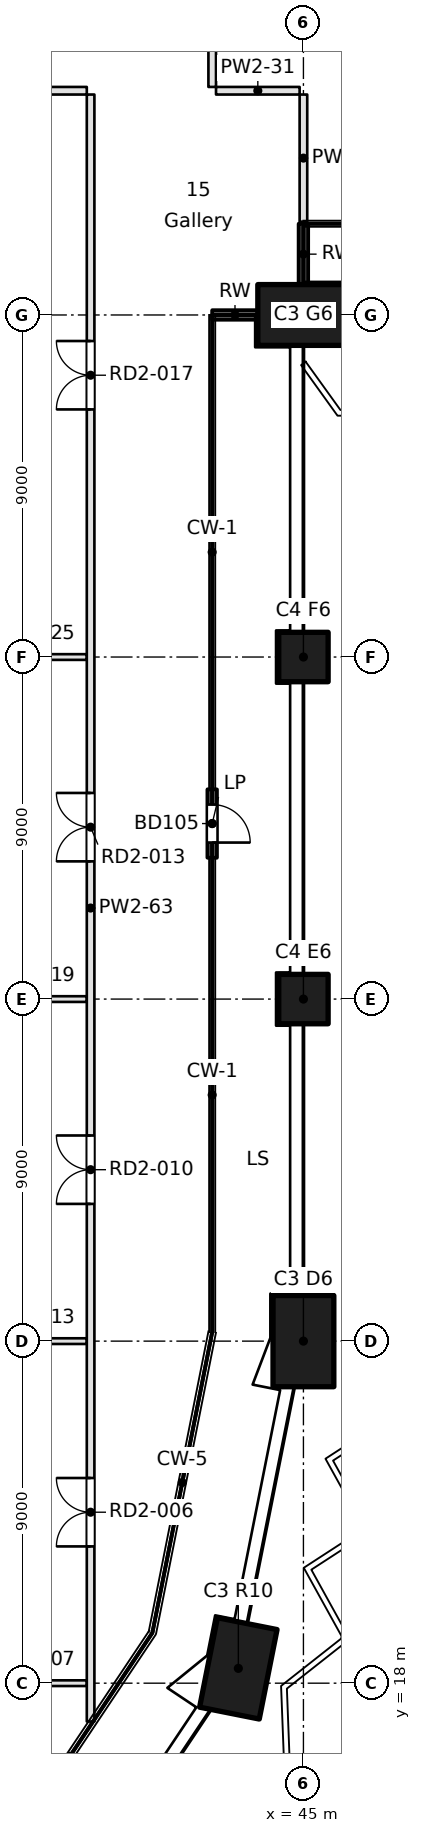
"""IFC4 building model, lengths in metres.
Left out: names, types, materials, properties, quantities, classifications, styles, units other than length and angle.
Written with IfcOpenShell. Run it as: python <this file> out.ifc"""

import sys

from ifc_helpers import new_model, si_unit, direction, frame, frame_2d, origin, origin_2d, place, context, subcontext, project, spatial, rectangle, extrude, element, fill, save


model = new_model("IFC4")
c1 = context("Model", 3, precision=1e-05, world=origin(), true_north=direction((0.0, 1.0)))
c2 = subcontext(c1, "Body", "Model", "MODEL_VIEW")
j1 = project(units=[si_unit("LENGTHUNIT", "METRE"), si_unit("PLANEANGLEUNIT", "RADIAN")], contexts=[c1])
p1 = place(None, origin())
s1 = spatial("IfcSite", under=j1, at=p1, CompositionType="ELEMENT")
p2 = place(p1, origin())
s2 = spatial("IfcBuilding", under=s1, at=p2, CompositionType="ELEMENT")
p3 = place(p2, frame((0.0, 0.0, 72.8)))
s3 = spatial("IfcBuildingStorey", under=s2, at=p3, CompositionType="ELEMENT", Elevation=72.8)
for number, where, z_axis, x_axis in (
    (1, (43.287, 18.39, 0.0), (0.0, 0.0, 1.0), (0.195, 0.981, 0.0)),
    (2, (45.0, 27.0, 0.0), (0.0, 0.0, 1.0), (0.0, 1.0, 0.0)),
):
    element("IfcColumn", number, at=place(p3, frame(where, z_axis=z_axis, x_axis=x_axis)), inside=s3, PredefinedType="COLUMN", context=c2, shape_type="SweptSolid", body=[
        extrude(rectangle(XDim=2.4, YDim=1.6, at=origin_2d()), origin(), (0.0, 0.0, 1.0), 3.7),
    ])
for number, where, z_axis, x_axis in (
    (3, (45.0, 36.0, 0.0), (0.0, 0.0, 1.0), (1.0, 0.0, 0.0)),
    (4, (45.0, 45.0, 0.0), (0.0, 0.0, 1.0), (1.0, 0.0, 0.0)),
):
    element("IfcColumn", number, at=place(p3, frame(where, z_axis=z_axis, x_axis=x_axis)), inside=s3, PredefinedType="COLUMN", context=c2, shape_type="SweptSolid", body=[
        extrude(rectangle(XDim=1.3, YDim=1.3, at=origin_2d()), origin(), (0.0, 0.0, 1.0), 3.7),
    ])
p4 = place(p3, frame((45.0, 54.0, 0.0), z_axis=(0.0, 0.0, 1.0), x_axis=(1.0, 0.0, 0.0)))
e5 = element("IfcColumn", 5, at=p4, inside=s3, PredefinedType="COLUMN", context=c2, shape_type="SweptSolid", body=[
    extrude(rectangle(XDim=2.4, YDim=1.6, at=origin_2d()), origin(), (0.0, 0.0, 1.0), 3.7),
])
p5 = place(p3, frame((42.599, 39.718, 0.0), z_axis=(0.0, 0.0, 1.0), x_axis=(0.0, 1.0, 0.0)))
e6 = element("IfcWall", 6, at=p5, inside=s3, PredefinedType="SOLIDWALL", context=c2, shape_type="SweptSolid", body=[
    extrude(rectangle(XDim=1.8, YDim=0.25, at=frame_2d((0.9, 0.0))), origin(), (0.0, 0.0, 1.0), 3.3),
])
p6 = place(p5, frame((0.4, 0.0, 0.0)))
e7 = element("IfcOpeningElement", 7, at=p6, cuts=e6, PredefinedType="OPENING", context=c2, shape_type="SweptSolid", body=[
    extrude(rectangle(XDim=1.0, YDim=2.1, at=frame_2d((0.5, 1.05))), frame((0.0, 0.125, 0.0), z_axis=(0.0, -1.0, 0.0), x_axis=(1.0, 0.0, 0.0)), (0.0, 0.0, 1.0), 0.25),
])
p7 = place(p3, frame((42.599, 54.0, 0.0), z_axis=(0.0, 0.0, 1.0), x_axis=(0.999999917344, 0.000406586671, 0.0)))
e8 = element("IfcWall", 8, at=p7, inside=s3, PredefinedType="SOLIDWALL", context=c2, shape_type="SweptSolid", body=[
    extrude(rectangle(XDim=1.201, YDim=0.25, at=frame_2d((0.601, 0.0))), origin(), (0.0, 0.0, 1.0), 3.3),
])
p8 = place(p3, frame((44.999, 54.8, 0.0), z_axis=(0.0, 0.0, 1.0), x_axis=(0.000152508767, 0.999999988371, 0.0)))
e9 = element("IfcWall", 9, at=p8, inside=s3, PredefinedType="SOLIDWALL", context=c2, shape_type="SweptSolid", body=[
    extrude(rectangle(XDim=1.601, YDim=0.25, at=frame_2d((0.8, 0.0))), origin(), (0.0, 0.0, 1.0), 3.3),
])
for number, where, z_axis, x_axis in (
    (10, (36.7, 18.0, 0.0), (0.0, 0.0, 1.0), (1.0, 0.0, 0.0)),
    (11, (36.7, 27.0, 0.0), (0.0, 0.0, 1.0), (1.0, 0.0, 0.0)),
    (12, (36.7, 36.0, 0.0), (0.0, 0.0, 1.0), (1.0, 0.0, 0.0)),
    (13, (36.7, 45.0, 0.0), (0.0, 0.0, 1.0), (1.0, 0.0, 0.0)),
):
    element("IfcWall", number, at=place(p3, frame(where, z_axis=z_axis, x_axis=x_axis)), inside=s3, PredefinedType="PARTITIONING", context=c2, shape_type="SweptSolid", body=[
        extrude(rectangle(XDim=2.6, YDim=0.15, at=frame_2d((1.3, 0.0))), origin(), (0.0, 0.0, 1.0), 3.3),
    ])
p9 = place(p3, frame((39.3, 59.9, 0.0), z_axis=(0.0, 0.0, 1.0), x_axis=(-1.0, 0.0, 0.0)))
e14 = element("IfcWall", 14, at=p9, inside=s3, PredefinedType="PARTITIONING", context=c2, shape_type="SweptSolid", body=[
    extrude(rectangle(XDim=11.8, YDim=0.2, at=frame_2d((5.9, 0.0))), origin(), (0.0, 0.0, 1.0), 3.3),
])
p10 = place(p3, frame((42.7, 59.9, 0.0), z_axis=(0.0, 0.0, 1.0), x_axis=(1.0, 0.0, 0.0)))
e15 = element("IfcWall", 15, at=p10, inside=s3, PredefinedType="PARTITIONING", context=c2, shape_type="SweptSolid", body=[
    extrude(rectangle(XDim=2.2, YDim=0.2, at=frame_2d((1.1, 0.0))), origin(), (0.0, 0.0, 1.0), 3.3),
])
p11 = place(p3, frame((39.4, 16.991, 0.0), z_axis=(0.0, 0.0, 1.0), x_axis=(0.0, 1.0, 0.0)))
e16 = element("IfcWall", 16, at=p11, inside=s3, PredefinedType="PARTITIONING", context=c2, shape_type="SweptSolid", body=[
    extrude(rectangle(XDim=42.809, YDim=0.2, at=frame_2d((21.405, 0.0))), origin(), (0.0, 0.0, 1.0), 3.3),
])
p12 = place(p11, frame((4.608, 0.0, 0.0)))
e17 = element("IfcOpeningElement", 17, at=p12, cuts=e16, PredefinedType="OPENING", context=c2, shape_type="SweptSolid", body=[
    extrude(rectangle(XDim=1.8, YDim=2.1, at=frame_2d((0.9, 1.05))), frame((0.0, 0.1, 0.0), z_axis=(0.0, -1.0, 0.0), x_axis=(1.0, 0.0, 0.0)), (0.0, 0.0, 1.0), 0.2),
])
p13 = place(p11, frame((13.62, 0.0, 0.0)))
e18 = element("IfcOpeningElement", 18, at=p13, cuts=e16, PredefinedType="OPENING", context=c2, shape_type="SweptSolid", body=[
    extrude(rectangle(XDim=1.8, YDim=2.1, at=frame_2d((0.9, 1.05))), frame((0.0, 0.1, 0.0), z_axis=(0.0, -1.0, 0.0), x_axis=(1.0, 0.0, 0.0)), (0.0, 0.0, 1.0), 0.2),
])
p14 = place(p11, frame((22.633, 0.0, 0.0)))
e19 = element("IfcOpeningElement", 19, at=p14, cuts=e16, PredefinedType="OPENING", context=c2, shape_type="SweptSolid", body=[
    extrude(rectangle(XDim=1.8, YDim=2.1, at=frame_2d((0.9, 1.05))), frame((0.0, 0.1, 0.0), z_axis=(0.0, -1.0, 0.0), x_axis=(1.0, 0.0, 0.0)), (0.0, 0.0, 1.0), 0.2),
])
p15 = place(p11, frame((34.524, 0.0, 0.0)))
e20 = element("IfcOpeningElement", 20, at=p15, cuts=e16, PredefinedType="OPENING", context=c2, shape_type="SweptSolid", body=[
    extrude(rectangle(XDim=1.8, YDim=2.1, at=frame_2d((0.9, 1.05))), frame((0.0, 0.1, 0.0), z_axis=(0.0, -1.0, 0.0), x_axis=(1.0, 0.0, 0.0)), (0.0, 0.0, 1.0), 0.2),
])
p16 = place(p3, frame((42.6, 63.6, 0.0), z_axis=(0.0, 0.0, 1.0), x_axis=(0.0, -1.0, 0.0)))
e21 = element("IfcWall", 21, at=p16, inside=s3, PredefinedType="PARTITIONING", context=c2, shape_type="SweptSolid", body=[
    extrude(rectangle(XDim=3.6, YDim=0.2, at=frame_2d((1.8, 0.0))), origin(), (0.0, 0.0, 1.0), 3.3),
])
p17 = place(p3, frame((45.0, 59.8, 0.0), z_axis=(0.0, 0.0, 1.0), x_axis=(0.0, -1.0, 0.0)))
e22 = element("IfcWall", 22, at=p17, inside=s3, PredefinedType="PARTITIONING", context=c2, shape_type="SweptSolid", body=[
    extrude(rectangle(XDim=3.345, YDim=0.2, at=frame_2d((1.673, 0.0))), origin(), (0.0, 0.0, 1.0), 3.3),
])
p18 = place(p6, frame((1.0, 0.0, 0.0), z_axis=(0.0, 0.0, 1.0), x_axis=(-1.0, 0.0, 0.0)))
e23 = element("IfcDoor", 23, at=p18, inside=s3, OperationType="SINGLE_SWING_RIGHT", PredefinedType="DOOR", context=c2, shape_type="SweptSolid", body=[
    extrude(rectangle(XDim=1.0, YDim=2.1, at=frame_2d((0.5, 1.05))), frame((0.0, 0.025, 0.0), z_axis=(0.0, -1.0, 0.0), x_axis=(1.0, 0.0, 0.0)), (0.0, 0.0, 1.0), 0.05),
])
fill(e7, e23)
p19 = place(p12, origin())
e24 = element("IfcDoor", 24, at=p19, inside=s3, OperationType="DOUBLE_DOOR_SINGLE_SWING", PredefinedType="DOOR", context=c2, shape_type="SweptSolid", body=[
    extrude(rectangle(XDim=1.8, YDim=2.1, at=frame_2d((0.9, 1.05))), frame((0.0, 0.025, 0.0), z_axis=(0.0, -1.0, 0.0), x_axis=(1.0, 0.0, 0.0)), (0.0, 0.0, 1.0), 0.05),
])
fill(e17, e24)
p20 = place(p13, origin())
e25 = element("IfcDoor", 25, at=p20, inside=s3, OperationType="DOUBLE_DOOR_SINGLE_SWING", PredefinedType="DOOR", context=c2, shape_type="SweptSolid", body=[
    extrude(rectangle(XDim=1.8, YDim=2.1, at=frame_2d((0.9, 1.05))), frame((0.0, 0.025, 0.0), z_axis=(0.0, -1.0, 0.0), x_axis=(1.0, 0.0, 0.0)), (0.0, 0.0, 1.0), 0.05),
])
fill(e18, e25)
p21 = place(p14, origin())
e26 = element("IfcDoor", 26, at=p21, inside=s3, OperationType="DOUBLE_DOOR_SINGLE_SWING", PredefinedType="DOOR", context=c2, shape_type="SweptSolid", body=[
    extrude(rectangle(XDim=1.8, YDim=2.1, at=frame_2d((0.9, 1.05))), frame((0.0, 0.025, 0.0), z_axis=(0.0, -1.0, 0.0), x_axis=(1.0, 0.0, 0.0)), (0.0, 0.0, 1.0), 0.05),
])
fill(e19, e26)
p22 = place(p15, origin())
e27 = element("IfcDoor", 27, at=p22, inside=s3, OperationType="DOUBLE_DOOR_SINGLE_SWING", PredefinedType="DOOR", context=c2, shape_type="SweptSolid", body=[
    extrude(rectangle(XDim=1.8, YDim=2.1, at=frame_2d((0.9, 1.05))), frame((0.0, 0.025, 0.0), z_axis=(0.0, -1.0, 0.0), x_axis=(1.0, 0.0, 0.0)), (0.0, 0.0, 1.0), 0.05),
])
fill(e20, e27)
save(model, sys.argv[1])
